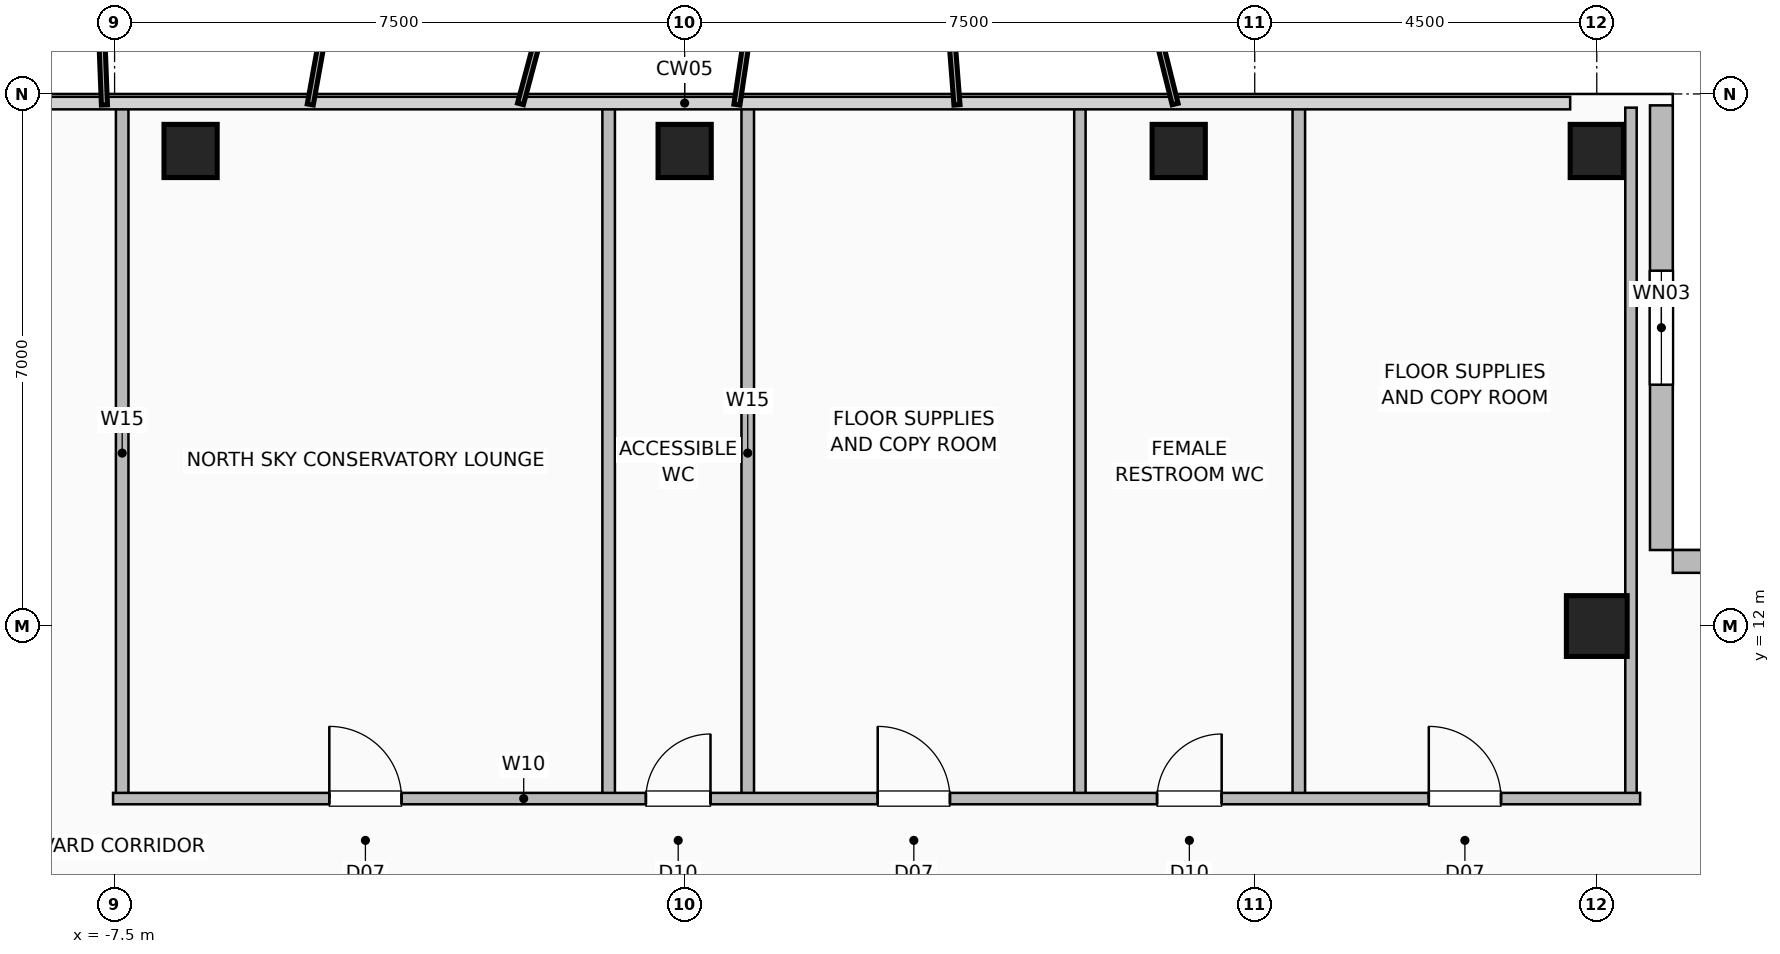
"""IFC4 building model, lengths in metres.
Left out: names, types, materials, properties, quantities, classifications, styles, units other than length and angle.
Written with IfcOpenShell. Run it as: python <this file> out.ifc"""

import sys

from ifc_helpers import new_model, si_unit, direction, frame, frame_2d, origin, origin_2d, place, context, subcontext, project, spatial, rectangle, hollow_rectangle, extrude, element, fill, save


model = new_model("IFC4")
c1 = context("Model", 3, precision=1e-05, world=origin(), true_north=direction((0.0, 1.0)))
c2 = subcontext(c1, "Body", "Model", "MODEL_VIEW")
j1 = project(units=[si_unit("LENGTHUNIT", "METRE"), si_unit("PLANEANGLEUNIT", "RADIAN")], contexts=[c1])
p1 = place(None, origin())
s1 = spatial("IfcSite", under=j1, at=p1, CompositionType="ELEMENT")
p2 = place(p1, origin())
s2 = spatial("IfcBuilding", under=s1, at=p2, CompositionType="ELEMENT")
p3 = place(p2, frame((0.0, 0.0, 272.0)))
s3 = spatial("IfcBuildingStorey", under=s2, at=p3, CompositionType="ELEMENT", Elevation=272.0)
for number, where, z_axis, x_axis in (
    (1, (-6.5, 18.25, 0.0), (0.0, 0.0, 1.0), (1.0, 0.0, 0.0)),
    (2, (0.0, 18.25, 0.0), (0.0, 0.0, 1.0), (1.0, 0.0, 0.0)),
    (3, (6.5, 18.25, 0.0), (0.0, 0.0, 1.0), (1.0, 0.0, 0.0)),
    (4, (12.0, 18.25, 0.0), (0.0, 0.0, 1.0), (1.0, 0.0, 0.0)),
):
    element("IfcColumn", number, at=place(p3, frame(where, z_axis=z_axis, x_axis=x_axis)), inside=s3, PredefinedType="COLUMN", context=c2, shape_type="SweptSolid", body=[
        extrude(hollow_rectangle(XDim=0.7, YDim=0.7, WallThickness=0.035, at=origin_2d()), origin(), (0.0, 0.0, 1.0), 3.6),
    ])
p4 = place(p3, frame((12.0, 12.0, 0.0), z_axis=(0.0, 0.0, 1.0), x_axis=(1.0, 0.0, 0.0)))
e5 = element("IfcColumn", 5, at=p4, inside=s3, PredefinedType="COLUMN", context=c2, shape_type="SweptSolid", body=[
    extrude(hollow_rectangle(XDim=0.8, YDim=0.8, WallThickness=0.04, at=origin_2d()), origin(), (0.0, 0.0, 1.0), 3.6),
])
p5 = place(p3, frame((12.85, 18.85, 0.0), z_axis=(0.0, 0.0, 1.0), x_axis=(0.0, -1.0, 0.0)))
e6 = element("IfcWall", 6, at=p5, inside=s3, PredefinedType="SOLIDWALL", context=c2, shape_type="SweptSolid", body=[
    extrude(rectangle(XDim=5.85, YDim=0.3, at=frame_2d((2.925, 0.0))), origin(), (0.0, 0.0, 1.0), 3.36),
])
p6 = place(p5, frame((2.175, 0.0, 0.9)))
e7 = element("IfcOpeningElement", 7, at=p6, cuts=e6, PredefinedType="OPENING", context=c2, shape_type="SweptSolid", body=[
    extrude(rectangle(XDim=1.5, YDim=1.8, at=frame_2d((0.75, 0.9))), frame((0.0, 0.16, 0.0), z_axis=(0.0, -1.0, 0.0), x_axis=(1.0, 0.0, 0.0)), (0.0, 0.0, 1.0), 0.32),
])
p7 = place(p3, frame((18.85, 12.85, 0.0), z_axis=(0.0, 0.0, 1.0), x_axis=(-1.0, 0.0, 0.0)))
e8 = element("IfcWall", 8, at=p7, inside=s3, PredefinedType="SOLIDWALL", context=c2, shape_type="SweptSolid", body=[
    extrude(rectangle(XDim=5.85, YDim=0.3, at=frame_2d((2.925, 0.0))), origin(), (0.0, 0.0, 1.0), 3.36),
])
for number, where, z_axis, x_axis in (
    (9, (0.83, 9.73, 0.0), (0.0, 0.0, 1.0), (0.0, 1.0, 0.0)),
    (10, (8.08, 9.73, 0.0), (0.0, 0.0, 1.0), (0.0, 1.0, 0.0)),
    (11, (-7.4, 9.73, 0.0), (0.0, 0.0, 1.0), (0.0, 1.0, 0.0)),
    (12, (-1.0, 9.73, 0.0), (0.0, 0.0, 1.0), (0.0, 1.0, 0.0)),
):
    element("IfcWall", number, at=place(p3, frame(where, z_axis=z_axis, x_axis=x_axis)), inside=s3, PredefinedType="PLUMBINGWALL", context=c2, shape_type="SweptSolid", body=[
        extrude(rectangle(XDim=9.09, YDim=0.165, at=frame_2d((4.545, 0.0))), origin(), (0.0, 0.0, 1.0), 3.36),
    ])
for number, where, z_axis, x_axis in (
    (13, (5.2, 9.73, 0.0), (0.0, 0.0, 1.0), (0.0, 1.0, 0.0)),
    (14, (12.45, 9.73, 0.0), (0.0, 0.0, 1.0), (0.0, 1.0, 0.0)),
):
    element("IfcWall", number, at=place(p3, frame(where, z_axis=z_axis, x_axis=x_axis)), inside=s3, PredefinedType="PARTITIONING", context=c2, shape_type="SweptSolid", body=[
        extrude(rectangle(XDim=9.09, YDim=0.15, at=frame_2d((4.545, 0.0))), origin(), (0.0, 0.0, 1.0), 3.36),
    ])
p8 = place(p3, frame((-7.52, 9.73, 0.0), z_axis=(0.0, 0.0, 1.0), x_axis=(1.0, 0.0, 0.0)))
e15 = element("IfcWall", 15, at=p8, inside=s3, PredefinedType="PARTITIONING", context=c2, shape_type="SweptSolid", body=[
    extrude(rectangle(XDim=20.09, YDim=0.15, at=frame_2d((10.045, 0.0))), origin(), (0.0, 0.0, 1.0), 3.36),
])
p9 = place(p8, frame((2.845, 0.0, 0.0)))
e16 = element("IfcOpeningElement", 16, at=p9, cuts=e15, PredefinedType="OPENING", context=c2, shape_type="SweptSolid", body=[
    extrude(rectangle(XDim=0.95, YDim=2.06, at=frame_2d((0.475, 1.03))), frame((0.0, 0.085, 0.0), z_axis=(0.0, -1.0, 0.0), x_axis=(1.0, 0.0, 0.0)), (0.0, 0.0, 1.0), 0.17),
])
p10 = place(p8, frame((7.01, 0.0, 0.0)))
e17 = element("IfcOpeningElement", 17, at=p10, cuts=e15, PredefinedType="OPENING", context=c2, shape_type="SweptSolid", body=[
    extrude(rectangle(XDim=0.85, YDim=2.05, at=frame_2d((0.425, 1.025))), frame((0.0, 0.085, 0.0), z_axis=(0.0, -1.0, 0.0), x_axis=(1.0, 0.0, 0.0)), (0.0, 0.0, 1.0), 0.17),
])
p11 = place(p8, frame((10.06, 0.0, 0.0)))
e18 = element("IfcOpeningElement", 18, at=p11, cuts=e15, PredefinedType="OPENING", context=c2, shape_type="SweptSolid", body=[
    extrude(rectangle(XDim=0.95, YDim=2.06, at=frame_2d((0.475, 1.03))), frame((0.0, 0.085, 0.0), z_axis=(0.0, -1.0, 0.0), x_axis=(1.0, 0.0, 0.0)), (0.0, 0.0, 1.0), 0.17),
])
p12 = place(p8, frame((13.735, 0.0, 0.0)))
e19 = element("IfcOpeningElement", 19, at=p12, cuts=e15, PredefinedType="OPENING", context=c2, shape_type="SweptSolid", body=[
    extrude(rectangle(XDim=0.85, YDim=2.05, at=frame_2d((0.425, 1.025))), frame((0.0, 0.085, 0.0), z_axis=(0.0, -1.0, 0.0), x_axis=(1.0, 0.0, 0.0)), (0.0, 0.0, 1.0), 0.17),
])
p13 = place(p8, frame((17.31, 0.0, 0.0)))
e20 = element("IfcOpeningElement", 20, at=p13, cuts=e15, PredefinedType="OPENING", context=c2, shape_type="SweptSolid", body=[
    extrude(rectangle(XDim=0.95, YDim=2.06, at=frame_2d((0.475, 1.03))), frame((0.0, 0.085, 0.0), z_axis=(0.0, -1.0, 0.0), x_axis=(1.0, 0.0, 0.0)), (0.0, 0.0, 1.0), 0.17),
])
p14 = place(p6, origin())
e21 = element("IfcWindow", 21, at=p14, inside=s3, PartitioningType="SINGLE_PANEL", PredefinedType="WINDOW", context=c2, shape_type="SweptSolid", body=[
    extrude(rectangle(XDim=1.5, YDim=1.8, at=frame_2d((0.75, 0.9))), frame((0.0, 0.03, 0.0), z_axis=(0.0, -1.0, 0.0), x_axis=(1.0, 0.0, 0.0)), (0.0, 0.0, 1.0), 0.06),
])
fill(e7, e21)
p15 = place(p9, origin())
e22 = element("IfcDoor", 22, at=p15, inside=s3, OperationType="SINGLE_SWING_LEFT", PredefinedType="DOOR", context=c2, shape_type="SweptSolid", body=[
    extrude(rectangle(XDim=0.95, YDim=2.06, at=frame_2d((0.475, 1.03))), frame((0.0, 0.025, 0.0), z_axis=(0.0, -1.0, 0.0), x_axis=(1.0, 0.0, 0.0)), (0.0, 0.0, 1.0), 0.05),
])
fill(e16, e22)
p16 = place(p10, origin())
e23 = element("IfcDoor", 23, at=p16, inside=s3, OperationType="SINGLE_SWING_RIGHT", PredefinedType="DOOR", context=c2, shape_type="SweptSolid", body=[
    extrude(rectangle(XDim=0.85, YDim=2.05, at=frame_2d((0.425, 1.025))), frame((0.0, 0.025, 0.0), z_axis=(0.0, -1.0, 0.0), x_axis=(1.0, 0.0, 0.0)), (0.0, 0.0, 1.0), 0.05),
])
fill(e17, e23)
p17 = place(p11, origin())
e24 = element("IfcDoor", 24, at=p17, inside=s3, OperationType="SINGLE_SWING_LEFT", PredefinedType="DOOR", context=c2, shape_type="SweptSolid", body=[
    extrude(rectangle(XDim=0.95, YDim=2.06, at=frame_2d((0.475, 1.03))), frame((0.0, 0.025, 0.0), z_axis=(0.0, -1.0, 0.0), x_axis=(1.0, 0.0, 0.0)), (0.0, 0.0, 1.0), 0.05),
])
fill(e18, e24)
p18 = place(p12, origin())
e25 = element("IfcDoor", 25, at=p18, inside=s3, OperationType="SINGLE_SWING_RIGHT", PredefinedType="DOOR", context=c2, shape_type="SweptSolid", body=[
    extrude(rectangle(XDim=0.85, YDim=2.05, at=frame_2d((0.425, 1.025))), frame((0.0, 0.025, 0.0), z_axis=(0.0, -1.0, 0.0), x_axis=(1.0, 0.0, 0.0)), (0.0, 0.0, 1.0), 0.05),
])
fill(e19, e25)
p19 = place(p13, origin())
e26 = element("IfcDoor", 26, at=p19, inside=s3, OperationType="SINGLE_SWING_LEFT", PredefinedType="DOOR", context=c2, shape_type="SweptSolid", body=[
    extrude(rectangle(XDim=0.95, YDim=2.06, at=frame_2d((0.475, 1.03))), frame((0.0, 0.025, 0.0), z_axis=(0.0, -1.0, 0.0), x_axis=(1.0, 0.0, 0.0)), (0.0, 0.0, 1.0), 0.05),
])
fill(e20, e26)
save(model, sys.argv[1])
